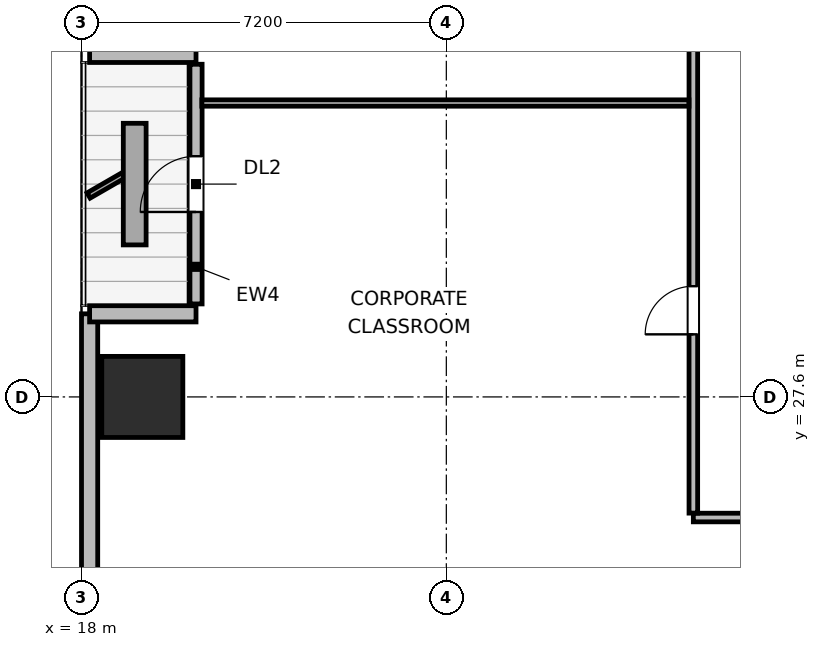
"""IFC4 building model, lengths in metres.
Left out: names, types, materials, properties, quantities, classifications, styles, units other than length and angle.
Written with IfcOpenShell. Run it as: python <this file> out.ifc"""

import sys

from ifc_helpers import new_model, si_unit, direction, frame, frame_2d, origin, origin_2d, place, context, subcontext, project, spatial, rectangle, extrude, element, fill, save


model = new_model("IFC4")
c1 = context("Model", 3, precision=1e-05, world=origin(), true_north=direction((0.0, 1.0)))
c2 = subcontext(c1, "Body", "Model", "MODEL_VIEW")
j1 = project(units=[si_unit("LENGTHUNIT", "METRE"), si_unit("PLANEANGLEUNIT", "RADIAN")], contexts=[c1])
p1 = place(None, origin())
s1 = spatial("IfcSite", under=j1, at=p1, CompositionType="ELEMENT")
p2 = place(p1, origin())
s2 = spatial("IfcBuilding", under=s1, at=p2, CompositionType="ELEMENT")
p3 = place(p2, frame((0.0, 0.0, 41.1)))
s3 = spatial("IfcBuildingStorey", under=s2, at=p3, CompositionType="ELEMENT", Elevation=41.1)
p4 = place(p3, frame((19.2, 27.6, 0.0), z_axis=(0.0, 0.0, 1.0), x_axis=(1.0, 0.0, 0.0)))
e1 = element("IfcColumn", 1, at=p4, inside=s3, PredefinedType="COLUMN", context=c2, shape_type="SweptSolid", body=[
    extrude(rectangle(XDim=1.6, YDim=1.6, at=origin_2d()), origin(), (0.0, 0.0, 1.0), 3.9),
])
p5 = place(p3, frame((18.16, 15.021, 0.0), z_axis=(0.0, 0.0, 1.0), x_axis=(0.0, 1.0, 0.0)))
e2 = element("IfcWall", 2, at=p5, inside=s3, PredefinedType="SOLIDWALL", context=c2, shape_type="SweptSolid", body=[
    extrude(rectangle(XDim=14.219, YDim=0.32, at=frame_2d((7.109, 0.0))), origin(), (0.0, 0.0, 1.0), 3.64),
])
p6 = place(p3, frame((18.16, 29.24, 0.0), z_axis=(0.0, 0.0, 1.0), x_axis=(1.0, 0.0, 0.0)))
e3 = element("IfcWall", 3, at=p6, inside=s3, PredefinedType="SOLIDWALL", context=c2, shape_type="SweptSolid", body=[
    extrude(rectangle(XDim=2.1, YDim=0.32, at=frame_2d((1.05, 0.0))), origin(), (0.0, 0.0, 1.0), 2.875),
])
p7 = place(p3, frame((20.26, 29.435, 0.0), z_axis=(0.0, 0.0, 1.0), x_axis=(0.0, 1.0, 0.0)))
e4 = element("IfcWall", 4, at=p7, inside=s3, PredefinedType="SOLIDWALL", context=c2, shape_type="SweptSolid", body=[
    extrude(rectangle(XDim=4.73, YDim=0.24, at=frame_2d((2.365, 0.0))), origin(), (0.0, 0.0, 1.0), 3.162),
])
p8 = place(p7, frame((1.815, 0.0, 0.0)))
e5 = element("IfcOpeningElement", 5, at=p8, cuts=e4, PredefinedType="OPENING", context=c2, shape_type="SweptSolid", body=[
    extrude(rectangle(XDim=1.1, YDim=2.04, at=frame_2d((0.55, 1.02))), frame((0.0, 0.13, 0.0), z_axis=(0.0, -1.0, 0.0), x_axis=(1.0, 0.0, 0.0)), (0.0, 0.0, 1.0), 0.26),
])
p9 = place(p3, frame((20.26, 34.36, 0.0), z_axis=(0.0, 0.0, 1.0), x_axis=(-1.0, 0.0, 0.0)))
e6 = element("IfcWall", 6, at=p9, inside=s3, PredefinedType="SOLIDWALL", context=c2, shape_type="SweptSolid", body=[
    extrude(rectangle(XDim=2.1, YDim=0.32, at=frame_2d((1.05, 0.0))), origin(), (0.0, 0.0, 1.0), 2.875),
])
p10 = place(p3, frame((30.075, 25.22, 0.0), z_axis=(0.0, 0.0, 1.0), x_axis=(1.0, 0.0, 0.0)))
e7 = element("IfcWall", 7, at=p10, inside=s3, PredefinedType="PARTITIONING", context=c2, shape_type="SweptSolid", body=[
    extrude(rectangle(XDim=35.85, YDim=0.17, at=frame_2d((17.925, 0.0))), origin(), (0.0, 0.0, 1.0), 3.64),
])
p11 = place(p10, frame((4.308, 0.0, 0.0)))
e8 = element("IfcOpeningElement", 8, at=p11, cuts=e7, PredefinedType="OPENING", context=c2, shape_type="SweptSolid", body=[
    extrude(rectangle(XDim=0.95, YDim=2.04, at=frame_2d((0.475, 1.02))), frame((0.0, 0.095, 0.0), z_axis=(0.0, -1.0, 0.0), x_axis=(1.0, 0.0, 0.0)), (0.0, 0.0, 1.0), 0.19),
])
p12 = place(p10, frame((13.27, 0.0, 0.0)))
e9 = element("IfcOpeningElement", 9, at=p12, cuts=e7, PredefinedType="OPENING", context=c2, shape_type="SweptSolid", body=[
    extrude(rectangle(XDim=0.95, YDim=2.04, at=frame_2d((0.475, 1.02))), frame((0.0, 0.095, 0.0), z_axis=(0.0, -1.0, 0.0), x_axis=(1.0, 0.0, 0.0)), (0.0, 0.0, 1.0), 0.19),
])
p13 = place(p10, frame((21.63, 0.0, 0.0)))
e10 = element("IfcOpeningElement", 10, at=p13, cuts=e7, PredefinedType="OPENING", context=c2, shape_type="SweptSolid", body=[
    extrude(rectangle(XDim=0.95, YDim=2.04, at=frame_2d((0.475, 1.02))), frame((0.0, 0.095, 0.0), z_axis=(0.0, -1.0, 0.0), x_axis=(1.0, 0.0, 0.0)), (0.0, 0.0, 1.0), 0.19),
])
p14 = place(p10, frame((30.592, 0.0, 0.0)))
e11 = element("IfcOpeningElement", 11, at=p14, cuts=e7, PredefinedType="OPENING", context=c2, shape_type="SweptSolid", body=[
    extrude(rectangle(XDim=0.95, YDim=2.04, at=frame_2d((0.475, 1.02))), frame((0.0, 0.095, 0.0), z_axis=(0.0, -1.0, 0.0), x_axis=(1.0, 0.0, 0.0)), (0.0, 0.0, 1.0), 0.19),
])
p15 = place(p3, frame((30.075, 25.307, 0.0), z_axis=(0.0, 0.0, 1.0), x_axis=(0.0, 1.0, 0.0)))
e12 = element("IfcWall", 12, at=p15, inside=s3, PredefinedType="PARTITIONING", context=c2, shape_type="SweptSolid", body=[
    extrude(rectangle(XDim=21.386, YDim=0.17, at=frame_2d((10.693, 0.0))), origin(), (0.0, 0.0, 1.0), 3.64),
])
p16 = place(p15, frame((3.528, 0.0, 0.0)))
e13 = element("IfcOpeningElement", 13, at=p16, cuts=e12, PredefinedType="OPENING", context=c2, shape_type="SweptSolid", body=[
    extrude(rectangle(XDim=0.95, YDim=2.04, at=frame_2d((0.475, 1.02))), frame((0.0, 0.095, 0.0), z_axis=(0.0, -1.0, 0.0), x_axis=(1.0, 0.0, 0.0)), (0.0, 0.0, 1.0), 0.19),
])
p17 = place(p15, frame((10.818, 0.0, 0.0)))
e14 = element("IfcOpeningElement", 14, at=p17, cuts=e12, PredefinedType="OPENING", context=c2, shape_type="SweptSolid", body=[
    extrude(rectangle(XDim=0.95, YDim=2.04, at=frame_2d((0.475, 1.02))), frame((0.0, 0.095, 0.0), z_axis=(0.0, -1.0, 0.0), x_axis=(1.0, 0.0, 0.0)), (0.0, 0.0, 1.0), 0.19),
])
p18 = place(p15, frame((17.508, 0.0, 0.0)))
e15 = element("IfcOpeningElement", 15, at=p18, cuts=e12, PredefinedType="OPENING", context=c2, shape_type="SweptSolid", body=[
    extrude(rectangle(XDim=0.95, YDim=2.04, at=frame_2d((0.475, 1.02))), frame((0.0, 0.095, 0.0), z_axis=(0.0, -1.0, 0.0), x_axis=(1.0, 0.0, 0.0)), (0.0, 0.0, 1.0), 0.19),
])
p19 = place(p3, frame((20.375, 33.4, 0.0), z_axis=(0.0, 0.0, 1.0), x_axis=(1.0, 0.0, 0.0)))
e16 = element("IfcWall", 16, at=p19, inside=s3, PredefinedType="PARTITIONING", context=c2, shape_type="SweptSolid", body=[
    extrude(rectangle(XDim=9.613, YDim=0.125, at=frame_2d((4.807, 0.0))), origin(), (0.0, 0.0, 1.0), 3.64),
])
p20 = place(p8, origin())
e17 = element("IfcDoor", 17, at=p20, inside=s3, OperationType="SINGLE_SWING_LEFT", PredefinedType="DOOR", context=c2, shape_type="SweptSolid", body=[
    extrude(rectangle(XDim=1.1, YDim=2.04, at=frame_2d((0.55, 1.02))), frame((0.0, 0.025, 0.0), z_axis=(0.0, -1.0, 0.0), x_axis=(1.0, 0.0, 0.0)), (0.0, 0.0, 1.0), 0.05),
])
fill(e5, e17)
p21 = place(p16, origin())
e18 = element("IfcDoor", 18, at=p21, inside=s3, OperationType="SINGLE_SWING_LEFT", PredefinedType="DOOR", context=c2, shape_type="SweptSolid", body=[
    extrude(rectangle(XDim=0.95, YDim=2.04, at=frame_2d((0.475, 1.02))), frame((0.0, 0.025, 0.0), z_axis=(0.0, -1.0, 0.0), x_axis=(1.0, 0.0, 0.0)), (0.0, 0.0, 1.0), 0.05),
])
fill(e13, e18)
save(model, sys.argv[1])
